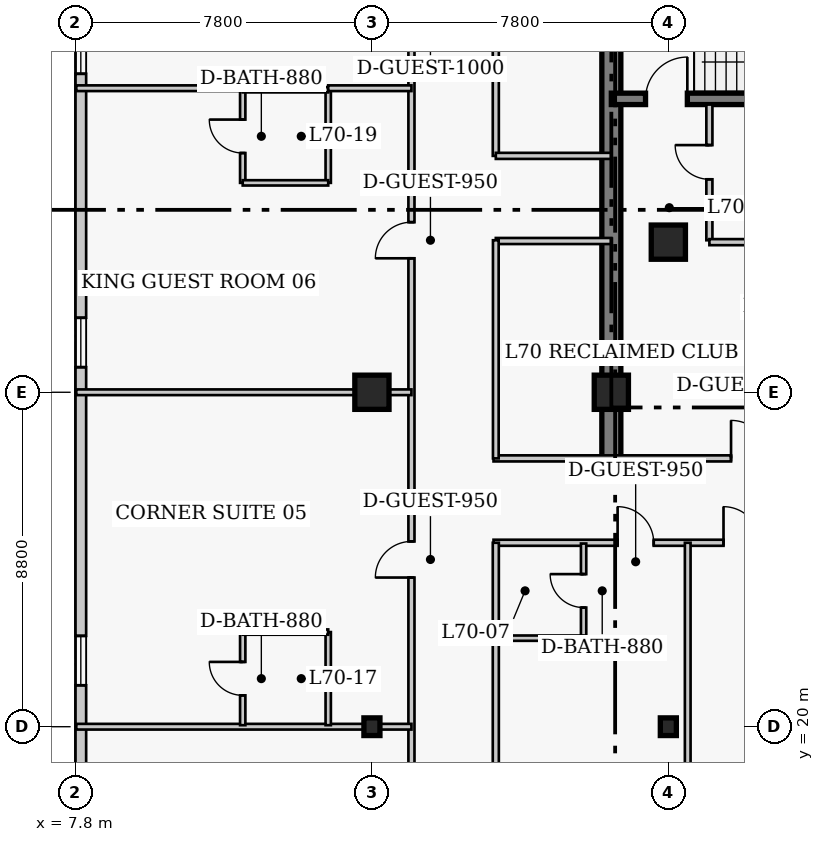
"""IFC4 building model, lengths in metres.
Left out: names, types, materials, properties, quantities, classifications, styles, units other than length and angle.
Written with IfcOpenShell. Run it as: python <this file> out.ifc"""

import sys

from ifc_helpers import new_model, si_unit, direction, frame, frame_2d, origin, origin_2d, place, context, subcontext, project, spatial, rectangle, i_section, extrude, element, fill, save


model = new_model("IFC4")
c1 = context("Model", 3, precision=1e-05, world=origin(), true_north=direction((0.0, 1.0)))
c2 = subcontext(c1, "Body", "Model", "MODEL_VIEW")
j1 = project(units=[si_unit("LENGTHUNIT", "METRE"), si_unit("PLANEANGLEUNIT", "RADIAN")], contexts=[c1])
p1 = place(None, origin())
s1 = spatial("IfcSite", under=j1, at=p1, CompositionType="ELEMENT")
p2 = place(p1, origin())
s2 = spatial("IfcBuilding", under=s1, at=p2, CompositionType="ELEMENT")
p3 = place(p2, frame((0.0, 0.0, 281.4)))
s3 = spatial("IfcBuildingStorey", under=s2, at=p3, CompositionType="ELEMENT", Elevation=281.4)
p4 = place(p3, frame((21.9, 27.05, 0.0), z_axis=(0.0, 0.0, 1.0), x_axis=(0.0, 1.0, 0.0)))
e1 = element("IfcWall", 1, at=p4, inside=s3, PredefinedType="SHEAR", context=c2, shape_type="SweptSolid", body=[
    extrude(rectangle(XDim=13.52, YDim=0.5, at=frame_2d((6.76, 0.0))), origin(), (0.0, 0.0, 1.0), 4.0),
])
p5 = place(p3, frame((21.9, 36.52, 0.0), z_axis=(0.0, 0.0, 1.0), x_axis=(1.0, 0.0, 0.0)))
e2 = element("IfcWall", 2, at=p5, inside=s3, PredefinedType="SHEAR", context=c2, shape_type="SweptSolid", body=[
    extrude(rectangle(XDim=8.32, YDim=0.3, at=frame_2d((4.16, 0.0))), origin(), (0.0, 0.0, 1.0), 4.0),
])
p6 = place(p5, frame((0.9, 0.0, 0.0)))
e3 = element("IfcOpeningElement", 3, at=p6, cuts=e2, PredefinedType="OPENING", context=c2, shape_type="SweptSolid", body=[
    extrude(rectangle(XDim=1.1, YDim=2.15, at=frame_2d((0.55, 1.075))), frame((0.0, 0.16, 0.0), z_axis=(0.0, -1.0, 0.0), x_axis=(1.0, 0.0, 0.0)), (0.0, 0.0, 1.0), 0.32),
])
p7 = place(p3, frame((15.6, 20.0, 0.0), z_axis=(0.0, 0.0, 1.0), x_axis=(1.0, 0.0, 0.0)))
e4 = element("IfcColumn", 4, at=p7, inside=s3, PredefinedType="COLUMN", context=c2, shape_type="SweptSolid", body=[
    extrude(i_section(OverallWidth=0.422, OverallDepth=0.465, WebThickness=0.045, FlangeThickness=0.073, FilletRadius=0.017, at=origin_2d()), origin(), (0.0, 0.0, 1.0), 4.0),
])
p8 = place(p3, frame((15.6, 28.8, 0.0), z_axis=(0.0, 0.0, 1.0), x_axis=(1.0, 0.0, 0.0)))
e5 = element("IfcColumn", 5, at=p8, inside=s3, PredefinedType="COLUMN", context=c2, shape_type="SweptSolid", body=[
    extrude(rectangle(XDim=0.9, YDim=0.9, at=origin_2d()), origin(), (0.0, 0.0, 1.0), 4.0),
])
p9 = place(p3, frame((23.4, 20.0, 0.0), z_axis=(0.0, 0.0, 1.0), x_axis=(1.0, 0.0, 0.0)))
e6 = element("IfcColumn", 6, at=p9, inside=s3, PredefinedType="COLUMN", context=c2, shape_type="SweptSolid", body=[
    extrude(i_section(OverallWidth=0.422, OverallDepth=0.465, WebThickness=0.045, FlangeThickness=0.073, FilletRadius=0.017, at=origin_2d()), origin(), (0.0, 0.0, 1.0), 4.0),
])
for number, where, z_axis, x_axis in (
    (7, (21.9, 28.8, 0.0), (0.0, 0.0, 1.0), (1.0, 0.0, 0.0)),
    (8, (23.4, 32.75, 0.0), (0.0, 0.0, 1.0), (1.0, 0.0, 0.0)),
):
    element("IfcColumn", number, at=place(p3, frame(where, z_axis=z_axis, x_axis=x_axis)), inside=s3, PredefinedType="COLUMN", context=c2, shape_type="SweptSolid", body=[
        extrude(rectangle(XDim=0.9, YDim=0.9, at=origin_2d()), origin(), (0.0, 0.0, 1.0), 4.0),
    ])
p10 = place(p3, frame((7.94, 41.04, 0.0), z_axis=(0.0, 0.0, 1.0), x_axis=(0.0, -1.0, 0.0)))
e9 = element("IfcWall", 9, at=p10, inside=s3, PredefinedType="SOLIDWALL", context=c2, shape_type="SweptSolid", body=[
    extrude(rectangle(XDim=30.88, YDim=0.28, at=frame_2d((15.44, 0.0))), origin(), (0.0, 0.0, 1.0), 3.76),
])
p11 = place(p10, frame((2.56, 0.0, 0.85)))
e10 = element("IfcOpeningElement", 10, at=p11, cuts=e9, PredefinedType="OPENING", context=c2, shape_type="SweptSolid", body=[
    extrude(rectangle(XDim=1.3, YDim=1.7, at=frame_2d((0.65, 0.85))), frame((0.0, 0.15, 0.0), z_axis=(0.0, -1.0, 0.0), x_axis=(1.0, 0.0, 0.0)), (0.0, 0.0, 1.0), 0.3),
])
p12 = place(p10, frame((10.28, 0.0, 0.85)))
e11 = element("IfcOpeningElement", 11, at=p12, cuts=e9, PredefinedType="OPENING", context=c2, shape_type="SweptSolid", body=[
    extrude(rectangle(XDim=1.3, YDim=1.7, at=frame_2d((0.65, 0.85))), frame((0.0, 0.15, 0.0), z_axis=(0.0, -1.0, 0.0), x_axis=(1.0, 0.0, 0.0)), (0.0, 0.0, 1.0), 0.3),
])
p13 = place(p10, frame((18.65, 0.0, 0.85)))
e12 = element("IfcOpeningElement", 12, at=p13, cuts=e9, PredefinedType="OPENING", context=c2, shape_type="SweptSolid", body=[
    extrude(rectangle(XDim=1.3, YDim=1.7, at=frame_2d((0.65, 0.85))), frame((0.0, 0.15, 0.0), z_axis=(0.0, -1.0, 0.0), x_axis=(1.0, 0.0, 0.0)), (0.0, 0.0, 1.0), 0.3),
])
p14 = place(p10, frame((26.37, 0.0, 0.85)))
e13 = element("IfcOpeningElement", 13, at=p14, cuts=e9, PredefinedType="OPENING", context=c2, shape_type="SweptSolid", body=[
    extrude(rectangle(XDim=1.3, YDim=1.7, at=frame_2d((0.65, 0.85))), frame((0.0, 0.15, 0.0), z_axis=(0.0, -1.0, 0.0), x_axis=(1.0, 0.0, 0.0)), (0.0, 0.0, 1.0), 0.3),
])
p15 = place(p3, frame((24.48, 32.8, 0.0), z_axis=(0.0, 0.0, 1.0), x_axis=(0.0, 1.0, 0.0)))
e14 = element("IfcWall", 14, at=p15, inside=s3, PredefinedType="PARTITIONING", context=c2, shape_type="SweptSolid", body=[
    extrude(rectangle(XDim=3.57, YDim=0.16, at=frame_2d((1.785, 0.0))), origin(), (0.0, 0.0, 1.0), 3.76),
])
p16 = place(p15, frame((1.604, 0.0, 0.0)))
e15 = element("IfcOpeningElement", 15, at=p16, cuts=e14, PredefinedType="OPENING", context=c2, shape_type="SweptSolid", body=[
    extrude(rectangle(XDim=0.9, YDim=2.1, at=frame_2d((0.45, 1.05))), frame((0.0, 0.09, 0.0), z_axis=(0.0, -1.0, 0.0), x_axis=(1.0, 0.0, 0.0)), (0.0, 0.0, 1.0), 0.18),
])
p17 = place(p3, frame((24.48, 32.75, 0.0), z_axis=(0.0, 0.0, 1.0), x_axis=(1.0, 0.0, 0.0)))
e16 = element("IfcWall", 16, at=p17, inside=s3, PredefinedType="PARTITIONING", context=c2, shape_type="SweptSolid", body=[
    extrude(rectangle(XDim=3.97, YDim=0.16, at=frame_2d((1.985, 0.0))), origin(), (0.0, 0.0, 1.0), 3.76),
])
p18 = place(p17, frame((2.575, 0.0, 0.0)))
e17 = element("IfcOpeningElement", 17, at=p18, cuts=e16, PredefinedType="OPENING", context=c2, shape_type="SweptSolid", body=[
    extrude(rectangle(XDim=0.88, YDim=2.05, at=frame_2d((0.44, 1.025))), frame((0.0, 0.09, 0.0), z_axis=(0.0, -1.0, 0.0), x_axis=(1.0, 0.0, 0.0)), (0.0, 0.0, 1.0), 0.18),
])
p19 = place(p3, frame((18.8, 27.06, 0.0), z_axis=(0.0, 0.0, 1.0), x_axis=(1.0, 0.0, 0.0)))
e18 = element("IfcWall", 18, at=p19, inside=s3, PredefinedType="PARTITIONING", context=c2, shape_type="SweptSolid", body=[
    extrude(rectangle(XDim=14.85, YDim=0.16, at=frame_2d((7.425, 0.0))), origin(), (0.0, 0.0, 1.0), 3.76),
])
p20 = place(p19, frame((6.25, 0.0, 0.0)))
e19 = element("IfcOpeningElement", 19, at=p20, cuts=e18, PredefinedType="OPENING", context=c2, shape_type="SweptSolid", body=[
    extrude(rectangle(XDim=1.0, YDim=2.15, at=frame_2d((0.5, 1.075))), frame((0.0, 0.09, 0.0), z_axis=(0.0, -1.0, 0.0), x_axis=(1.0, 0.0, 0.0)), (0.0, 0.0, 1.0), 0.18),
])
p21 = place(p3, frame((18.8, 24.84, 0.0), z_axis=(0.0, 0.0, 1.0), x_axis=(1.0, 0.0, 0.0)))
e20 = element("IfcWall", 20, at=p21, inside=s3, PredefinedType="PARTITIONING", context=c2, shape_type="SweptSolid", body=[
    extrude(rectangle(XDim=17.0, YDim=0.16, at=frame_2d((8.5, 0.0))), origin(), (0.0, 0.0, 1.0), 3.76),
])
p22 = place(p21, frame((3.265, 0.0, 0.0)))
e21 = element("IfcOpeningElement", 21, at=p22, cuts=e20, PredefinedType="OPENING", context=c2, shape_type="SweptSolid", body=[
    extrude(rectangle(XDim=0.95, YDim=2.1, at=frame_2d((0.475, 1.05))), frame((0.0, 0.09, 0.0), z_axis=(0.0, -1.0, 0.0), x_axis=(1.0, 0.0, 0.0)), (0.0, 0.0, 1.0), 0.18),
])
p23 = place(p21, frame((6.052, 0.0, 0.0)))
e22 = element("IfcOpeningElement", 22, at=p23, cuts=e20, PredefinedType="OPENING", context=c2, shape_type="SweptSolid", body=[
    extrude(rectangle(XDim=0.95, YDim=2.1, at=frame_2d((0.475, 1.05))), frame((0.0, 0.09, 0.0), z_axis=(0.0, -1.0, 0.0), x_axis=(1.0, 0.0, 0.0)), (0.0, 0.0, 1.0), 0.18),
])
p24 = place(p21, frame((13.127, 0.0, 0.0)))
e23 = element("IfcOpeningElement", 23, at=p24, cuts=e20, PredefinedType="OPENING", context=c2, shape_type="SweptSolid", body=[
    extrude(rectangle(XDim=1.0, YDim=2.15, at=frame_2d((0.5, 1.075))), frame((0.0, 0.09, 0.0), z_axis=(0.0, -1.0, 0.0), x_axis=(1.0, 0.0, 0.0)), (0.0, 0.0, 1.0), 0.18),
])
p25 = place(p3, frame((16.64, 8.55, 0.0), z_axis=(0.0, 0.0, 1.0), x_axis=(0.0, 1.0, 0.0)))
e24 = element("IfcWall", 24, at=p25, inside=s3, PredefinedType="PARTITIONING", context=c2, shape_type="SweptSolid", body=[
    extrude(rectangle(XDim=32.1, YDim=0.16, at=frame_2d((16.05, 0.0))), origin(), (0.0, 0.0, 1.0), 3.76),
])
p26 = place(p25, frame((5.25, 0.0, 0.0)))
e25 = element("IfcOpeningElement", 25, at=p26, cuts=e24, PredefinedType="OPENING", context=c2, shape_type="SweptSolid", body=[
    extrude(rectangle(XDim=0.95, YDim=2.1, at=frame_2d((0.475, 1.05))), frame((0.0, 0.09, 0.0), z_axis=(0.0, -1.0, 0.0), x_axis=(1.0, 0.0, 0.0)), (0.0, 0.0, 1.0), 0.18),
])
p27 = place(p25, frame((15.375, 0.0, 0.0)))
e26 = element("IfcOpeningElement", 26, at=p27, cuts=e24, PredefinedType="OPENING", context=c2, shape_type="SweptSolid", body=[
    extrude(rectangle(XDim=0.95, YDim=2.1, at=frame_2d((0.475, 1.05))), frame((0.0, 0.09, 0.0), z_axis=(0.0, -1.0, 0.0), x_axis=(1.0, 0.0, 0.0)), (0.0, 0.0, 1.0), 0.18),
])
p28 = place(p25, frame((23.775, 0.0, 0.0)))
e27 = element("IfcOpeningElement", 27, at=p28, cuts=e24, PredefinedType="OPENING", context=c2, shape_type="SweptSolid", body=[
    extrude(rectangle(XDim=0.95, YDim=2.1, at=frame_2d((0.475, 1.05))), frame((0.0, 0.09, 0.0), z_axis=(0.0, -1.0, 0.0), x_axis=(1.0, 0.0, 0.0)), (0.0, 0.0, 1.0), 0.18),
])
p29 = place(p25, frame((30.66, 0.0, 0.0)))
e28 = element("IfcOpeningElement", 28, at=p29, cuts=e24, PredefinedType="OPENING", context=c2, shape_type="SweptSolid", body=[
    extrude(rectangle(XDim=1.0, YDim=2.15, at=frame_2d((0.5, 1.075))), frame((0.0, 0.09, 0.0), z_axis=(0.0, -1.0, 0.0), x_axis=(1.0, 0.0, 0.0)), (0.0, 0.0, 1.0), 0.18),
])
p30 = place(p3, frame((18.86, 8.55, 0.0), z_axis=(0.0, 0.0, 1.0), x_axis=(0.0, 1.0, 0.0)))
e29 = element("IfcWall", 29, at=p30, inside=s3, PredefinedType="PARTITIONING", context=c2, shape_type="SweptSolid", body=[
    extrude(rectangle(XDim=16.29, YDim=0.16, at=frame_2d((8.145, 0.0))), origin(), (0.0, 0.0, 1.0), 3.76),
])
p31 = place(p3, frame((18.86, 35.02, 0.0), z_axis=(0.0, 0.0, 1.0), x_axis=(0.0, 1.0, 0.0)))
e30 = element("IfcWall", 30, at=p31, inside=s3, PredefinedType="PARTITIONING", context=c2, shape_type="SweptSolid", body=[
    extrude(rectangle(XDim=5.63, YDim=0.16, at=frame_2d((2.815, 0.0))), origin(), (0.0, 0.0, 1.0), 3.76),
])
for number, where, z_axis, x_axis in (
    (31, (18.86, 35.02, 0.0), (0.0, 0.0, 1.0), (1.0, 0.0, 0.0)),
    (32, (18.86, 32.78, 0.0), (0.0, 0.0, 1.0), (1.0, 0.0, 0.0)),
):
    element("IfcWall", number, at=place(p3, frame(where, z_axis=z_axis, x_axis=x_axis)), inside=s3, PredefinedType="PARTITIONING", context=c2, shape_type="SweptSolid", body=[
        extrude(rectangle(XDim=3.04, YDim=0.16, at=frame_2d((1.52, 0.0))), origin(), (0.0, 0.0, 1.0), 3.76),
    ])
p32 = place(p3, frame((18.86, 27.06, 0.0), z_axis=(0.0, 0.0, 1.0), x_axis=(0.0, 1.0, 0.0)))
e33 = element("IfcWall", 33, at=p32, inside=s3, PredefinedType="PARTITIONING", context=c2, shape_type="SweptSolid", body=[
    extrude(rectangle(XDim=5.74, YDim=0.15, at=frame_2d((2.87, 0.0))), origin(), (0.0, 0.0, 1.0), 3.76),
])
p33 = place(p3, frame((21.17, 22.33, 0.0), z_axis=(0.0, 0.0, 1.0), x_axis=(0.0, 1.0, 0.0)))
e34 = element("IfcWall", 34, at=p33, inside=s3, PredefinedType="PLUMBINGWALL", context=c2, shape_type="SweptSolid", body=[
    extrude(rectangle(XDim=2.49, YDim=0.14, at=frame_2d((1.245, 0.0))), origin(), (0.0, 0.0, 1.0), 3.76),
])
p34 = place(p33, frame((0.805, 0.0, 0.0)))
e35 = element("IfcOpeningElement", 35, at=p34, cuts=e34, PredefinedType="OPENING", context=c2, shape_type="SweptSolid", body=[
    extrude(rectangle(XDim=0.88, YDim=2.05, at=frame_2d((0.44, 1.025))), frame((0.0, 0.08, 0.0), z_axis=(0.0, -1.0, 0.0), x_axis=(1.0, 0.0, 0.0)), (0.0, 0.0, 1.0), 0.16),
])
p35 = place(p3, frame((18.92, 22.33, 0.0), z_axis=(0.0, 0.0, 1.0), x_axis=(1.0, 0.0, 0.0)))
e36 = element("IfcWall", 36, at=p35, inside=s3, PredefinedType="PLUMBINGWALL", context=c2, shape_type="SweptSolid", body=[
    extrude(rectangle(XDim=2.25, YDim=0.14, at=frame_2d((1.125, 0.0))), origin(), (0.0, 0.0, 1.0), 3.76),
])
p36 = place(p3, frame((23.91, 6.52, 0.0), z_axis=(0.0, 0.0, 1.0), x_axis=(0.0, 1.0, 0.0)))
e37 = element("IfcWall", 37, at=p36, inside=s3, PredefinedType="PARTITIONING", context=c2, shape_type="SweptSolid", body=[
    extrude(rectangle(XDim=18.32, YDim=0.15, at=frame_2d((9.16, 0.0))), origin(), (0.0, 0.0, 1.0), 3.76),
])
p37 = place(p3, frame((7.82, 20.0, 0.0), z_axis=(0.0, 0.0, 1.0), x_axis=(1.0, 0.0, 0.0)))
e38 = element("IfcWall", 38, at=p37, inside=s3, PredefinedType="PARTITIONING", context=c2, shape_type="SweptSolid", body=[
    extrude(rectangle(XDim=8.82, YDim=0.15, at=frame_2d((4.41, 0.0))), origin(), (0.0, 0.0, 1.0), 3.064),
])
p38 = place(p3, frame((12.2, 20.04, 0.0), z_axis=(0.0, 0.0, 1.0), x_axis=(0.0, 1.0, 0.0)))
e39 = element("IfcWall", 39, at=p38, inside=s3, PredefinedType="PLUMBINGWALL", context=c2, shape_type="SweptSolid", body=[
    extrude(rectangle(XDim=2.45, YDim=0.14, at=frame_2d((1.225, 0.0))), origin(), (0.0, 0.0, 1.0), 3.76),
])
p39 = place(p38, frame((0.785, 0.0, 0.0)))
e40 = element("IfcOpeningElement", 40, at=p39, cuts=e39, PredefinedType="OPENING", context=c2, shape_type="SweptSolid", body=[
    extrude(rectangle(XDim=0.88, YDim=2.05, at=frame_2d((0.44, 1.025))), frame((0.0, 0.08, 0.0), z_axis=(0.0, -1.0, 0.0), x_axis=(1.0, 0.0, 0.0)), (0.0, 0.0, 1.0), 0.16),
])
p40 = place(p3, frame((14.45, 20.04, 0.0), z_axis=(0.0, 0.0, 1.0), x_axis=(0.0, 1.0, 0.0)))
e41 = element("IfcWall", 41, at=p40, inside=s3, PredefinedType="PLUMBINGWALL", context=c2, shape_type="SweptSolid", body=[
    extrude(rectangle(XDim=2.45, YDim=0.14, at=frame_2d((1.225, 0.0))), origin(), (0.0, 0.0, 1.0), 3.76),
])
p41 = place(p3, frame((12.2, 22.49, 0.0), z_axis=(0.0, 0.0, 1.0), x_axis=(1.0, 0.0, 0.0)))
e42 = element("IfcWall", 42, at=p41, inside=s3, PredefinedType="PLUMBINGWALL", context=c2, shape_type="SweptSolid", body=[
    extrude(rectangle(XDim=2.25, YDim=0.14, at=frame_2d((1.125, 0.0))), origin(), (0.0, 0.0, 1.0), 3.76),
])
p42 = place(p3, frame((7.82, 28.8, 0.0), z_axis=(0.0, 0.0, 1.0), x_axis=(1.0, 0.0, 0.0)))
e43 = element("IfcWall", 43, at=p42, inside=s3, PredefinedType="PARTITIONING", context=c2, shape_type="SweptSolid", body=[
    extrude(rectangle(XDim=8.82, YDim=0.15, at=frame_2d((4.41, 0.0))), origin(), (0.0, 0.0, 1.0), 3.064),
])
p43 = place(p3, frame((12.2, 34.31, 0.0), z_axis=(0.0, 0.0, 1.0), x_axis=(0.0, 1.0, 0.0)))
e44 = element("IfcWall", 44, at=p43, inside=s3, PredefinedType="PLUMBINGWALL", context=c2, shape_type="SweptSolid", body=[
    extrude(rectangle(XDim=2.45, YDim=0.14, at=frame_2d((1.225, 0.0))), origin(), (0.0, 0.0, 1.0), 3.76),
])
p44 = place(p43, frame((0.785, 0.0, 0.0)))
e45 = element("IfcOpeningElement", 45, at=p44, cuts=e44, PredefinedType="OPENING", context=c2, shape_type="SweptSolid", body=[
    extrude(rectangle(XDim=0.88, YDim=2.05, at=frame_2d((0.44, 1.025))), frame((0.0, 0.08, 0.0), z_axis=(0.0, -1.0, 0.0), x_axis=(1.0, 0.0, 0.0)), (0.0, 0.0, 1.0), 0.16),
])
p45 = place(p3, frame((14.45, 34.31, 0.0), z_axis=(0.0, 0.0, 1.0), x_axis=(0.0, 1.0, 0.0)))
e46 = element("IfcWall", 46, at=p45, inside=s3, PredefinedType="PLUMBINGWALL", context=c2, shape_type="SweptSolid", body=[
    extrude(rectangle(XDim=2.45, YDim=0.14, at=frame_2d((1.225, 0.0))), origin(), (0.0, 0.0, 1.0), 3.76),
])
for number, where, z_axis, x_axis in (
    (47, (12.2, 34.31, 0.0), (0.0, 0.0, 1.0), (1.0, 0.0, 0.0)),
    (48, (12.2, 36.76, 0.0), (0.0, 0.0, 1.0), (1.0, 0.0, 0.0)),
):
    element("IfcWall", number, at=place(p3, frame(where, z_axis=z_axis, x_axis=x_axis)), inside=s3, PredefinedType="PLUMBINGWALL", context=c2, shape_type="SweptSolid", body=[
        extrude(rectangle(XDim=2.25, YDim=0.14, at=frame_2d((1.125, 0.0))), origin(), (0.0, 0.0, 1.0), 3.76),
    ])
p46 = place(p3, frame((7.82, 36.8, 0.0), z_axis=(0.0, 0.0, 1.0), x_axis=(1.0, 0.0, 0.0)))
e49 = element("IfcWall", 49, at=p46, inside=s3, PredefinedType="PARTITIONING", context=c2, shape_type="SweptSolid", body=[
    extrude(rectangle(XDim=4.38, YDim=0.15, at=frame_2d((2.19, 0.0))), origin(), (0.0, 0.0, 1.0), 3.76),
])
p47 = place(p3, frame((14.45, 36.8, 0.0), z_axis=(0.0, 0.0, 1.0), x_axis=(1.0, 0.0, 0.0)))
e50 = element("IfcWall", 50, at=p47, inside=s3, PredefinedType="PARTITIONING", context=c2, shape_type="SweptSolid", body=[
    extrude(rectangle(XDim=2.19, YDim=0.15, at=frame_2d((1.095, 0.0))), origin(), (0.0, 0.0, 1.0), 3.76),
])
p48 = place(p11, origin())
e51 = element("IfcWindow", 51, at=p48, inside=s3, PartitioningType="SINGLE_PANEL", PredefinedType="WINDOW", context=c2, shape_type="SweptSolid", body=[
    extrude(rectangle(XDim=1.3, YDim=1.7, at=frame_2d((0.65, 0.85))), frame((0.0, 0.03, 0.0), z_axis=(0.0, -1.0, 0.0), x_axis=(1.0, 0.0, 0.0)), (0.0, 0.0, 1.0), 0.06),
])
fill(e10, e51)
p49 = place(p12, origin())
e52 = element("IfcWindow", 52, at=p49, inside=s3, PartitioningType="SINGLE_PANEL", PredefinedType="WINDOW", context=c2, shape_type="SweptSolid", body=[
    extrude(rectangle(XDim=1.3, YDim=1.7, at=frame_2d((0.65, 0.85))), frame((0.0, 0.03, 0.0), z_axis=(0.0, -1.0, 0.0), x_axis=(1.0, 0.0, 0.0)), (0.0, 0.0, 1.0), 0.06),
])
fill(e11, e52)
p50 = place(p13, origin())
e53 = element("IfcWindow", 53, at=p50, inside=s3, PartitioningType="SINGLE_PANEL", PredefinedType="WINDOW", context=c2, shape_type="SweptSolid", body=[
    extrude(rectangle(XDim=1.3, YDim=1.7, at=frame_2d((0.65, 0.85))), frame((0.0, 0.03, 0.0), z_axis=(0.0, -1.0, 0.0), x_axis=(1.0, 0.0, 0.0)), (0.0, 0.0, 1.0), 0.06),
])
fill(e12, e53)
p51 = place(p16, origin())
e54 = element("IfcDoor", 54, at=p51, inside=s3, OperationType="SINGLE_SWING_RIGHT", PredefinedType="DOOR", context=c2, shape_type="SweptSolid", body=[
    extrude(rectangle(XDim=0.9, YDim=2.1, at=frame_2d((0.45, 1.05))), frame((0.0, 0.025, 0.0), z_axis=(0.0, -1.0, 0.0), x_axis=(1.0, 0.0, 0.0)), (0.0, 0.0, 1.0), 0.05),
])
fill(e15, e54)
p52 = place(p20, origin())
e55 = element("IfcDoor", 55, at=p52, inside=s3, OperationType="SINGLE_SWING_LEFT", PredefinedType="DOOR", context=c2, shape_type="SweptSolid", body=[
    extrude(rectangle(XDim=1.0, YDim=2.15, at=frame_2d((0.5, 1.075))), frame((0.0, 0.025, 0.0), z_axis=(0.0, -1.0, 0.0), x_axis=(1.0, 0.0, 0.0)), (0.0, 0.0, 1.0), 0.05),
])
fill(e19, e55)
p53 = place(p34, origin())
e56 = element("IfcDoor", 56, at=p53, inside=s3, OperationType="SINGLE_SWING_RIGHT", PredefinedType="DOOR", context=c2, shape_type="SweptSolid", body=[
    extrude(rectangle(XDim=0.88, YDim=2.05, at=frame_2d((0.44, 1.025))), frame((0.0, 0.025, 0.0), z_axis=(0.0, -1.0, 0.0), x_axis=(1.0, 0.0, 0.0)), (0.0, 0.0, 1.0), 0.05),
])
fill(e35, e56)
p54 = place(p22, origin())
e57 = element("IfcDoor", 57, at=p54, inside=s3, OperationType="SINGLE_SWING_LEFT", PredefinedType="DOOR", context=c2, shape_type="SweptSolid", body=[
    extrude(rectangle(XDim=0.95, YDim=2.1, at=frame_2d((0.475, 1.05))), frame((0.0, 0.025, 0.0), z_axis=(0.0, -1.0, 0.0), x_axis=(1.0, 0.0, 0.0)), (0.0, 0.0, 1.0), 0.05),
])
fill(e21, e57)
p55 = place(p23, origin())
e58 = element("IfcDoor", 58, at=p55, inside=s3, OperationType="SINGLE_SWING_LEFT", PredefinedType="DOOR", context=c2, shape_type="SweptSolid", body=[
    extrude(rectangle(XDim=0.95, YDim=2.1, at=frame_2d((0.475, 1.05))), frame((0.0, 0.025, 0.0), z_axis=(0.0, -1.0, 0.0), x_axis=(1.0, 0.0, 0.0)), (0.0, 0.0, 1.0), 0.05),
])
fill(e22, e58)
p56 = place(p39, origin())
e59 = element("IfcDoor", 59, at=p56, inside=s3, OperationType="SINGLE_SWING_RIGHT", PredefinedType="DOOR", context=c2, shape_type="SweptSolid", body=[
    extrude(rectangle(XDim=0.88, YDim=2.05, at=frame_2d((0.44, 1.025))), frame((0.0, 0.025, 0.0), z_axis=(0.0, -1.0, 0.0), x_axis=(1.0, 0.0, 0.0)), (0.0, 0.0, 1.0), 0.05),
])
fill(e40, e59)
p57 = place(p27, origin())
e60 = element("IfcDoor", 60, at=p57, inside=s3, OperationType="SINGLE_SWING_LEFT", PredefinedType="DOOR", context=c2, shape_type="SweptSolid", body=[
    extrude(rectangle(XDim=0.95, YDim=2.1, at=frame_2d((0.475, 1.05))), frame((0.0, 0.025, 0.0), z_axis=(0.0, -1.0, 0.0), x_axis=(1.0, 0.0, 0.0)), (0.0, 0.0, 1.0), 0.05),
])
fill(e26, e60)
p58 = place(p44, origin())
e61 = element("IfcDoor", 61, at=p58, inside=s3, OperationType="SINGLE_SWING_RIGHT", PredefinedType="DOOR", context=c2, shape_type="SweptSolid", body=[
    extrude(rectangle(XDim=0.88, YDim=2.05, at=frame_2d((0.44, 1.025))), frame((0.0, 0.025, 0.0), z_axis=(0.0, -1.0, 0.0), x_axis=(1.0, 0.0, 0.0)), (0.0, 0.0, 1.0), 0.05),
])
fill(e45, e61)
p59 = place(p28, origin())
e62 = element("IfcDoor", 62, at=p59, inside=s3, OperationType="SINGLE_SWING_LEFT", PredefinedType="DOOR", context=c2, shape_type="SweptSolid", body=[
    extrude(rectangle(XDim=0.95, YDim=2.1, at=frame_2d((0.475, 1.05))), frame((0.0, 0.025, 0.0), z_axis=(0.0, -1.0, 0.0), x_axis=(1.0, 0.0, 0.0)), (0.0, 0.0, 1.0), 0.05),
])
fill(e27, e62)
p60 = place(p6, origin())
e63 = element("IfcDoor", 63, at=p60, inside=s3, OperationType="SINGLE_SWING_RIGHT", PredefinedType="DOOR", context=c2, shape_type="SweptSolid", body=[
    extrude(rectangle(XDim=1.1, YDim=2.15, at=frame_2d((0.55, 1.075))), frame((0.0, 0.025, 0.0), z_axis=(0.0, -1.0, 0.0), x_axis=(1.0, 0.0, 0.0)), (0.0, 0.0, 1.0), 0.05),
])
fill(e3, e63)
save(model, sys.argv[1])
